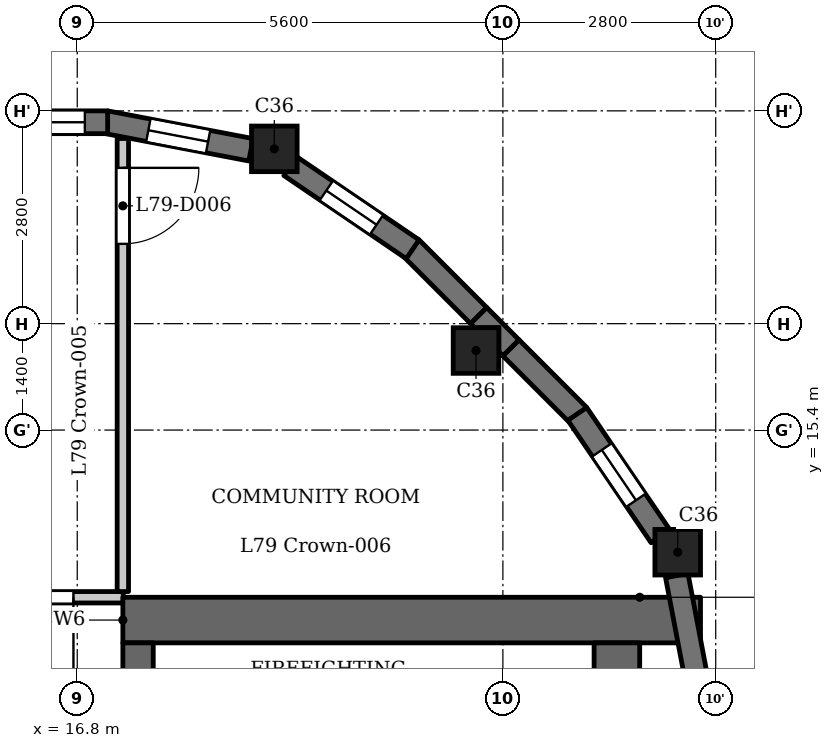
"""IFC4 building model, lengths in metres.
Left out: names, types, materials, properties, quantities, classifications, styles, units other than length and angle.
Written with IfcOpenShell. Run it as: python <this file> out.ifc"""

import sys

from ifc_helpers import new_model, si_unit, direction, frame, frame_2d, origin, origin_2d, place, context, subcontext, project, spatial, polyline, rectangle, outline, extrude, element, fill, save


model = new_model("IFC4")
c1 = context("Model", 3, precision=1e-05, world=origin(), true_north=direction((0.0, 1.0)))
c2 = subcontext(c1, "Body", "Model", "MODEL_VIEW")
j1 = project(units=[si_unit("LENGTHUNIT", "METRE"), si_unit("PLANEANGLEUNIT", "RADIAN")], contexts=[c1])
p1 = place(None, origin())
s1 = spatial("IfcSite", under=j1, at=p1, CompositionType="ELEMENT")
p2 = place(p1, origin())
s2 = spatial("IfcBuilding", under=s1, at=p2, CompositionType="ELEMENT")
p3 = place(p2, frame((0.0, 0.0, 306.9)))
s3 = spatial("IfcBuildingStorey", under=s2, at=p3, CompositionType="ELEMENT", Elevation=306.9)
for number, where, z_axis, x_axis in (
    (1, (19.393, 19.1, 0.0), (0.0, 0.0, 1.0), (1.0, 0.0, 0.0)),
    (2, (22.046, 16.446, 0.0), (0.0, 0.0, 1.0), (1.0, 0.0, 0.0)),
    (3, (24.7, 13.793, 0.0), (0.0, 0.0, 1.0), (1.0, 0.0, 0.0)),
):
    element("IfcColumn", number, at=place(p3, frame(where, z_axis=z_axis, x_axis=x_axis)), inside=s3, PredefinedType="COLUMN", context=c2, shape_type="SweptSolid", body=[
        extrude(rectangle(XDim=0.6, YDim=0.6, at=origin_2d()), origin(), (0.0, 0.0, 1.0), 3.5),
    ])
p4 = place(p3, frame((25.052, 11.573, 0.0), z_axis=(0.0, 0.0, 1.0), x_axis=(-0.187354129902, 0.982292436095, 0.0)))
e4 = element("IfcWall", 4, at=p4, inside=s3, PredefinedType="SOLIDWALL", context=c2, shape_type="SweptSolid", body=[
    extrude(rectangle(XDim=1.947, YDim=0.3, at=frame_2d((0.973, 0.0))), origin(), (0.0, 0.0, 1.0), 2.6),
])
p5 = place(p3, frame((24.474, 14.002, 0.0), z_axis=(0.0, 0.0, 1.0), x_axis=(-0.562025435703, 0.827119948752, 0.0)))
e5 = element("IfcWall", 5, at=p5, inside=s3, PredefinedType="SOLIDWALL", context=c2, shape_type="SweptSolid", body=[
    extrude(rectangle(XDim=1.948, YDim=0.3, at=frame_2d((0.974, 0.0))), origin(), (0.0, 0.0, 1.0), 2.6),
])
p6 = place(p5, frame((0.574, 0.0, 0.6)))
e6 = element("IfcOpeningElement", 6, at=p6, cuts=e5, PredefinedType="OPENING", context=c2, shape_type="SweptSolid", body=[
    extrude(rectangle(XDim=0.8, YDim=1.55, at=frame_2d((0.4, 0.775))), frame((0.0, 0.16, 0.0), z_axis=(0.0, -1.0, 0.0), x_axis=(1.0, 0.0, 0.0)), (0.0, 0.0, 1.0), 0.32),
])
for number, where, z_axis, x_axis in (
    (7, (23.397, 15.591, 0.0), (0.0, 0.0, 1.0), (-0.707, 0.707, 0.0)),
    (8, (22.082, 16.906, 0.0), (0.0, 0.0, 1.0), (-0.707, 0.707, 0.0)),
):
    element("IfcWall", number, at=place(p3, frame(where, z_axis=z_axis, x_axis=x_axis)), inside=s3, PredefinedType="SOLIDWALL", context=c2, shape_type="SweptSolid", body=[
        extrude(rectangle(XDim=1.26, YDim=0.3, at=frame_2d((0.63, 0.0))), origin(), (0.0, 0.0, 1.0), 3.2),
    ])
p7 = place(p3, frame((21.213, 17.779, 0.0), z_axis=(0.0, 0.0, 1.0), x_axis=(-0.827022075481, 0.562169446579, 0.0)))
e9 = element("IfcWall", 9, at=p7, inside=s3, PredefinedType="SOLIDWALL", context=c2, shape_type="SweptSolid", body=[
    extrude(rectangle(XDim=1.948, YDim=0.3, at=frame_2d((0.974, 0.0))), origin(), (0.0, 0.0, 1.0), 2.6),
])
p8 = place(p7, frame((0.574, 0.0, 0.6)))
e10 = element("IfcOpeningElement", 10, at=p8, cuts=e9, PredefinedType="OPENING", context=c2, shape_type="SweptSolid", body=[
    extrude(rectangle(XDim=0.8, YDim=1.55, at=frame_2d((0.4, 0.775))), frame((0.0, 0.16, 0.0), z_axis=(0.0, -1.0, 0.0), x_axis=(1.0, 0.0, 0.0)), (0.0, 0.0, 1.0), 0.32),
])
p9 = place(p3, frame((19.085, 19.088, 0.0), z_axis=(0.0, 0.0, 1.0), x_axis=(-0.982286967073, 0.187382801553, 0.0)))
e11 = element("IfcWall", 11, at=p9, inside=s3, PredefinedType="SOLIDWALL", context=c2, shape_type="SweptSolid", body=[
    extrude(rectangle(XDim=1.948, YDim=0.3, at=frame_2d((0.974, 0.0))), origin(), (0.0, 0.0, 1.0), 2.6),
])
p10 = place(p9, frame((0.574, 0.0, 0.6)))
e12 = element("IfcOpeningElement", 12, at=p10, cuts=e11, PredefinedType="OPENING", context=c2, shape_type="SweptSolid", body=[
    extrude(rectangle(XDim=0.8, YDim=1.55, at=frame_2d((0.4, 0.775))), frame((0.0, 0.16, 0.0), z_axis=(0.0, -1.0, 0.0), x_axis=(1.0, 0.0, 0.0)), (0.0, 0.0, 1.0), 0.32),
])
p11 = place(p3, frame((17.2, 19.45, 0.0), z_axis=(0.0, 0.0, 1.0), x_axis=(-1.0, 0.0, 0.0)))
e13 = element("IfcWall", 13, at=p11, inside=s3, PredefinedType="SOLIDWALL", context=c2, shape_type="SweptSolid", body=[
    extrude(rectangle(XDim=1.4, YDim=0.3, at=frame_2d((0.7, 0.0))), origin(), (0.0, 0.0, 1.0), 3.2),
])
p12 = place(p11, frame((0.3, 0.0, 0.6)))
e14 = element("IfcOpeningElement", 14, at=p12, cuts=e13, PredefinedType="OPENING", context=c2, shape_type="SweptSolid", body=[
    extrude(rectangle(XDim=0.8, YDim=1.55, at=frame_2d((0.4, 0.775))), frame((0.0, 0.16, 0.0), z_axis=(0.0, -1.0, 0.0), x_axis=(1.0, 0.0, 0.0)), (0.0, 0.0, 1.0), 0.32),
])
p13 = place(p3, frame((17.4, 12.9, 0.0), z_axis=(0.0, 0.0, 1.0), x_axis=(1.0, 0.0, 0.0)))
e15 = element("IfcWall", 15, at=p13, inside=s3, PredefinedType="SHEAR", context=c2, shape_type="SweptSolid", body=[
    extrude(rectangle(XDim=7.6, YDim=0.6, at=frame_2d((3.8, 0.0))), origin(), (0.0, 0.0, 1.0), 3.2),
])
p14 = place(p3, frame((17.6, -12.6, 0.0), z_axis=(0.0, 0.0, 1.0), x_axis=(0.0, 1.0, 0.0)))
e16 = element("IfcWall", 16, at=p14, inside=s3, PredefinedType="SHEAR", context=c2, shape_type="SweptSolid", body=[
    extrude(rectangle(XDim=25.2, YDim=0.4, at=frame_2d((12.6, 0.0))), origin(), (0.0, 0.0, 1.0), 3.2),
])
p15 = place(p14, frame((8.8, 0.0, 0.0)))
e17 = element("IfcOpeningElement", 17, at=p15, cuts=e16, PredefinedType="OPENING", context=c2, shape_type="SweptSolid", body=[
    extrude(rectangle(XDim=0.9, YDim=2.1, at=frame_2d((0.45, 1.05))), frame((0.0, 0.21, 0.0), z_axis=(0.0, -1.0, 0.0), x_axis=(1.0, 0.0, 0.0)), (0.0, 0.0, 1.0), 0.42),
])
p16 = place(p14, frame((17.05, 0.0, 0.0)))
e18 = element("IfcOpeningElement", 18, at=p16, cuts=e16, PredefinedType="OPENING", context=c2, shape_type="SweptSolid", body=[
    extrude(rectangle(XDim=0.9, YDim=2.1, at=frame_2d((0.45, 1.05))), frame((0.0, 0.21, 0.0), z_axis=(0.0, -1.0, 0.0), x_axis=(1.0, 0.0, 0.0)), (0.0, 0.0, 1.0), 0.42),
])
p17 = place(p14, frame((23.25, 0.0, 0.0)))
e19 = element("IfcOpeningElement", 19, at=p17, cuts=e16, PredefinedType="OPENING", context=c2, shape_type="SweptSolid", body=[
    extrude(rectangle(XDim=1.1, YDim=2.1, at=frame_2d((0.55, 1.05))), frame((0.0, 0.21, 0.0), z_axis=(0.0, -1.0, 0.0), x_axis=(1.0, 0.0, 0.0)), (0.0, 0.0, 1.0), 0.42),
])
p18 = place(p14, frame((0.85, 0.0, 0.0)))
e20 = element("IfcOpeningElement", 20, at=p18, cuts=e16, PredefinedType="OPENING", context=c2, shape_type="SweptSolid", body=[
    extrude(rectangle(XDim=1.1, YDim=2.1, at=frame_2d((0.55, 1.05))), frame((0.0, 0.21, 0.0), z_axis=(0.0, -1.0, 0.0), x_axis=(1.0, 0.0, 0.0)), (0.0, 0.0, 1.0), 0.42),
])
p19 = place(p14, frame((13.075, 0.0, 0.0)))
e21 = element("IfcOpeningElement", 21, at=p19, cuts=e16, PredefinedType="OPENING", context=c2, shape_type="SweptSolid", body=[
    extrude(rectangle(XDim=1.8, YDim=2.1, at=frame_2d((0.9, 1.05))), frame((0.0, 0.21, 0.0), z_axis=(0.0, -1.0, 0.0), x_axis=(1.0, 0.0, 0.0)), (0.0, 0.0, 1.0), 0.42),
])
p20 = place(p3, frame((23.9, -12.6, 0.0), z_axis=(0.0, 0.0, 1.0), x_axis=(0.0, 1.0, 0.0)))
e22 = element("IfcWall", 22, at=p20, inside=s3, PredefinedType="SHEAR", context=c2, shape_type="SweptSolid", body=[
    extrude(rectangle(XDim=25.2, YDim=0.6, at=frame_2d((12.6, 0.0))), origin(), (0.0, 0.0, 1.0), 3.2),
])
p21 = place(p3, frame((15.32, 13.2, 0.0), z_axis=(0.0, 0.0, 1.0), x_axis=(1.0, 0.0, 0.0)))
e23 = element("IfcWall", 23, at=p21, inside=s3, PredefinedType="PARTITIONING", context=c2, shape_type="SweptSolid", body=[
    extrude(rectangle(XDim=2.085, YDim=0.15, at=frame_2d((1.042, 0.0))), origin(), (0.0, 0.0, 1.0), 3.2),
])
p22 = place(p21, frame((0.43, 0.0, 0.0)))
e24 = element("IfcOpeningElement", 24, at=p22, cuts=e23, PredefinedType="OPENING", context=c2, shape_type="SweptSolid", body=[
    extrude(rectangle(XDim=1.0, YDim=2.1, at=frame_2d((0.5, 1.05))), frame((0.0, 0.085, 0.0), z_axis=(0.0, -1.0, 0.0), x_axis=(1.0, 0.0, 0.0)), (0.0, 0.0, 1.0), 0.17),
])
p23 = place(p3, frame((17.4, 13.275, 0.0), z_axis=(0.0, 0.0, 1.0), x_axis=(0.0, 1.0, 0.0)))
e25 = element("IfcWall", 25, at=p23, inside=s3, PredefinedType="PARTITIONING", context=c2, shape_type="SweptSolid", body=[
    extrude(rectangle(XDim=5.961, YDim=0.15, at=frame_2d((2.981, 0.0))), origin(), (0.0, 0.0, 1.0), 3.2),
])
p24 = place(p23, frame((4.575, 0.0, 0.0)))
e26 = element("IfcOpeningElement", 26, at=p24, cuts=e25, PredefinedType="OPENING", context=c2, shape_type="SweptSolid", body=[
    extrude(rectangle(XDim=1.0, YDim=2.1, at=frame_2d((0.5, 1.05))), frame((0.0, 0.085, 0.0), z_axis=(0.0, -1.0, 0.0), x_axis=(1.0, 0.0, 0.0)), (0.0, 0.0, 1.0), 0.17),
])
p25 = place(p3, origin())
e27 = element("IfcWall", 27, at=p25, inside=s3, PredefinedType="SOLIDWALL", context=c2, shape_type="SweptSolid", body=[
    extrude(outline(polyline([(22.4, 16.376), (22.612, 16.588), (22.188, 17.012), (21.976, 16.8), (22.029, 16.746), (22.346, 16.746), (22.346, 16.429), (22.4, 16.376)])), origin(), (0.0, 0.0, 1.0), 3.2),
])
p26 = place(p22, origin())
e28 = element("IfcDoor", 28, at=p26, inside=s3, OperationType="SINGLE_SWING_RIGHT", PredefinedType="DOOR", context=c2, shape_type="SweptSolid", body=[
    extrude(rectangle(XDim=1.0, YDim=2.1, at=frame_2d((0.5, 1.05))), frame((0.0, 0.025, 0.0), z_axis=(0.0, -1.0, 0.0), x_axis=(1.0, 0.0, 0.0)), (0.0, 0.0, 1.0), 0.05),
])
fill(e24, e28)
p27 = place(p24, origin())
e29 = element("IfcDoor", 29, at=p27, inside=s3, OperationType="SINGLE_SWING_RIGHT", PredefinedType="DOOR", context=c2, shape_type="SweptSolid", body=[
    extrude(rectangle(XDim=1.0, YDim=2.1, at=frame_2d((0.5, 1.05))), frame((0.0, 0.025, 0.0), z_axis=(0.0, -1.0, 0.0), x_axis=(1.0, 0.0, 0.0)), (0.0, 0.0, 1.0), 0.05),
])
fill(e26, e29)
p28 = place(p6, origin())
e30 = element("IfcWindow", 30, at=p28, inside=s3, PartitioningType="SINGLE_PANEL", PredefinedType="WINDOW", context=c2, shape_type="SweptSolid", body=[
    extrude(rectangle(XDim=0.8, YDim=1.55, at=frame_2d((0.4, 0.775))), frame((0.0, 0.03, 0.0), z_axis=(0.0, -1.0, 0.0), x_axis=(1.0, 0.0, 0.0)), (0.0, 0.0, 1.0), 0.06),
])
fill(e6, e30)
p29 = place(p8, origin())
e31 = element("IfcWindow", 31, at=p29, inside=s3, PartitioningType="SINGLE_PANEL", PredefinedType="WINDOW", context=c2, shape_type="SweptSolid", body=[
    extrude(rectangle(XDim=0.8, YDim=1.55, at=frame_2d((0.4, 0.775))), frame((0.0, 0.03, 0.0), z_axis=(0.0, -1.0, 0.0), x_axis=(1.0, 0.0, 0.0)), (0.0, 0.0, 1.0), 0.06),
])
fill(e10, e31)
p30 = place(p10, origin())
e32 = element("IfcWindow", 32, at=p30, inside=s3, PartitioningType="SINGLE_PANEL", PredefinedType="WINDOW", context=c2, shape_type="SweptSolid", body=[
    extrude(rectangle(XDim=0.8, YDim=1.55, at=frame_2d((0.4, 0.775))), frame((0.0, 0.03, 0.0), z_axis=(0.0, -1.0, 0.0), x_axis=(1.0, 0.0, 0.0)), (0.0, 0.0, 1.0), 0.06),
])
fill(e12, e32)
p31 = place(p12, origin())
e33 = element("IfcWindow", 33, at=p31, inside=s3, PartitioningType="SINGLE_PANEL", PredefinedType="WINDOW", context=c2, shape_type="SweptSolid", body=[
    extrude(rectangle(XDim=0.8, YDim=1.55, at=frame_2d((0.4, 0.775))), frame((0.0, 0.03, 0.0), z_axis=(0.0, -1.0, 0.0), x_axis=(1.0, 0.0, 0.0)), (0.0, 0.0, 1.0), 0.06),
])
fill(e14, e33)
save(model, sys.argv[1])
